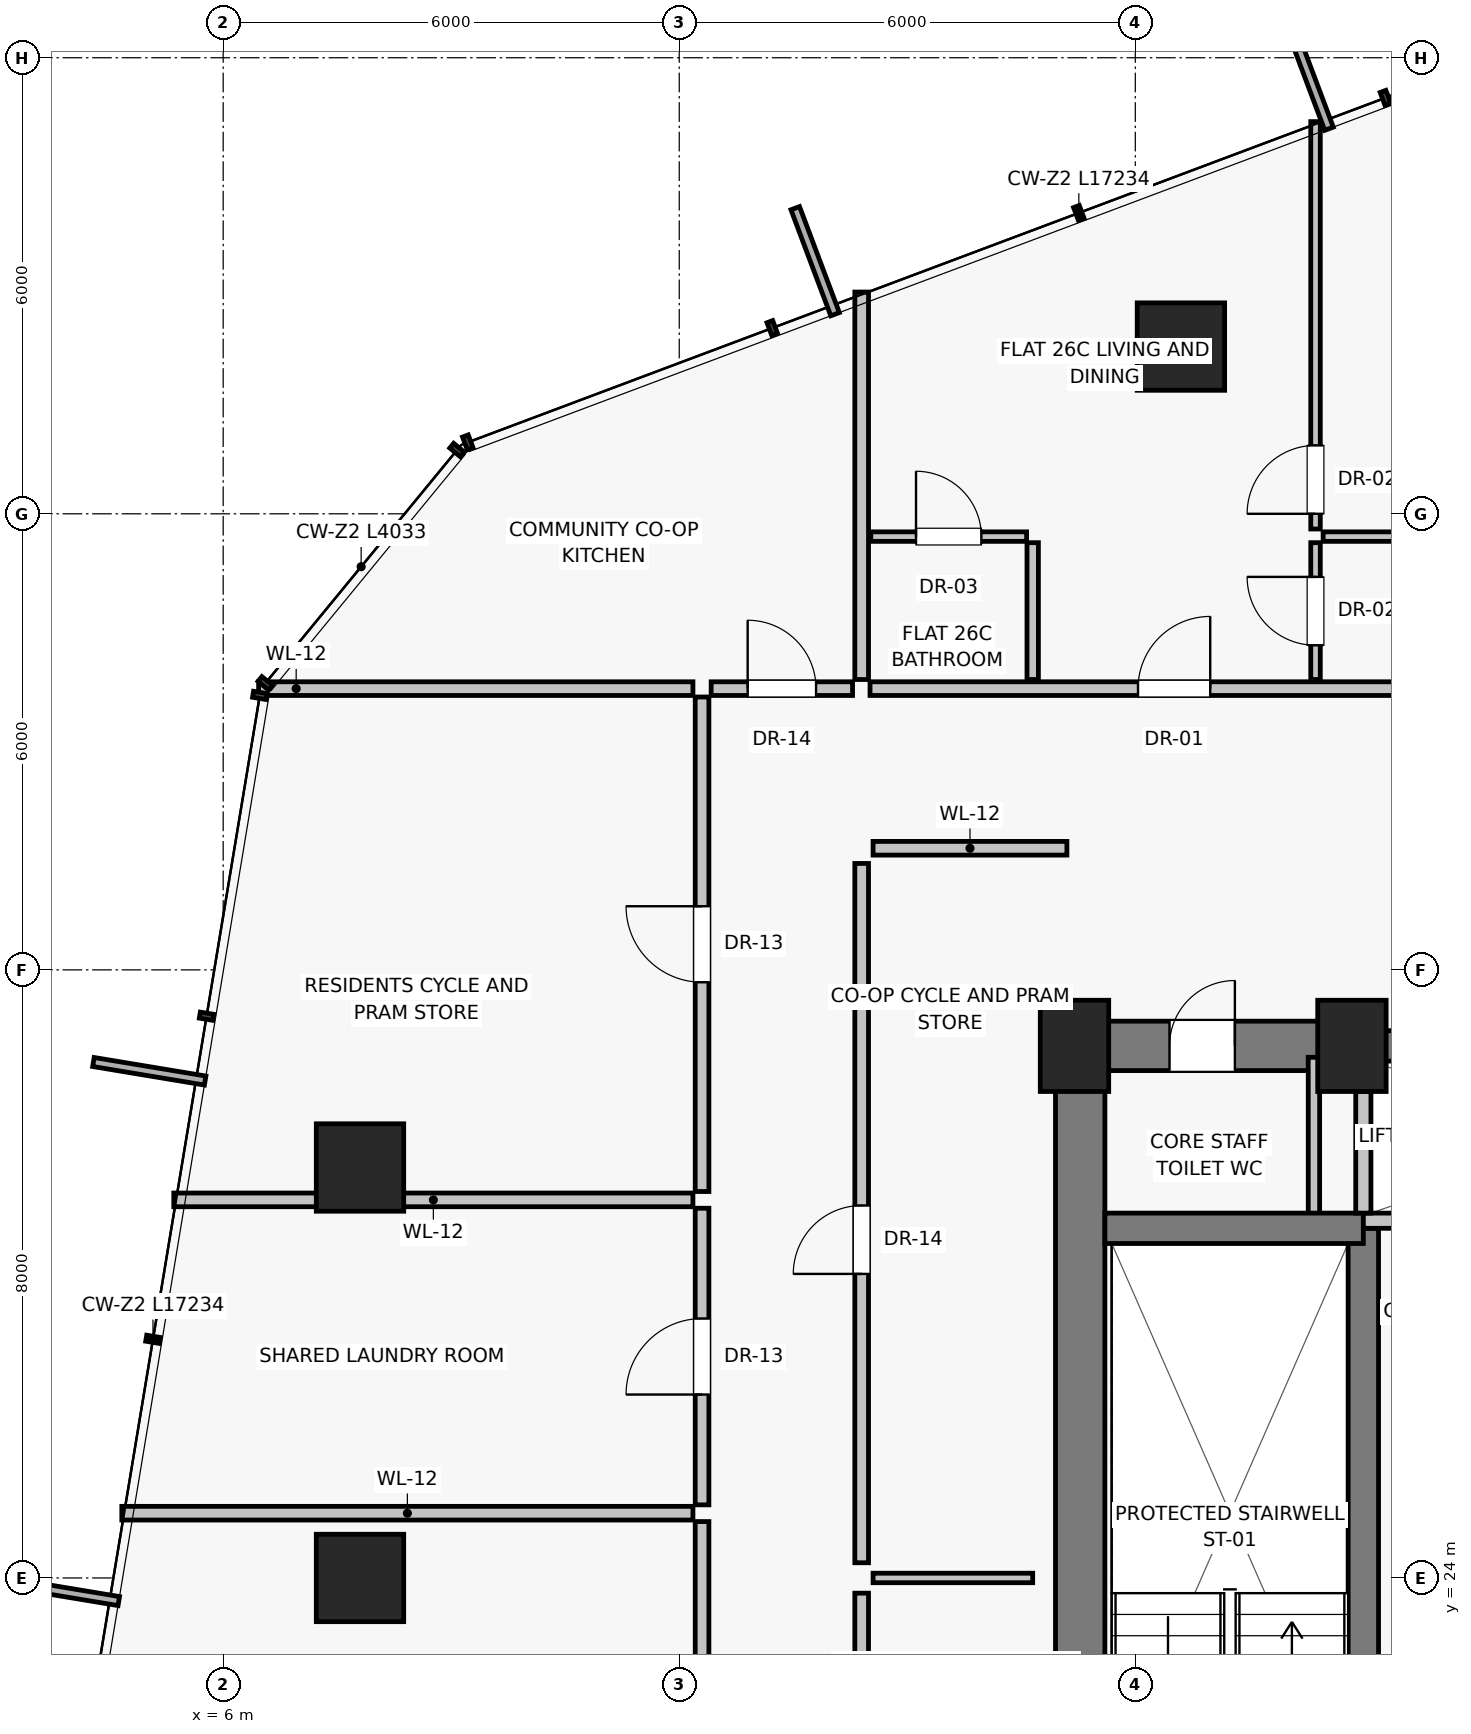
"""IFC4 building model, lengths in metres.
Left out: names, types, materials, properties, quantities, classifications, styles, units other than length and angle.
Written with IfcOpenShell. Run it as: python <this file> out.ifc"""

import sys

from ifc_helpers import new_model, si_unit, direction, frame, frame_2d, origin, origin_2d, place, context, subcontext, project, spatial, rectangle, extrude, source, transform, mapped, element, fill, save


model = new_model("IFC4")
c1 = context("Model", 3, precision=1e-05, world=origin(), true_north=direction((0.0, 1.0)))
c2 = subcontext(c1, "Body", "Model", "MODEL_VIEW")
j1 = project(units=[si_unit("LENGTHUNIT", "METRE"), si_unit("PLANEANGLEUNIT", "RADIAN")], contexts=[c1])
p1 = place(None, origin())
s1 = spatial("IfcSite", under=j1, at=p1, CompositionType="ELEMENT")
p2 = place(p1, origin())
s2 = spatial("IfcBuilding", under=s1, at=p2, CompositionType="ELEMENT")
p3 = place(p2, frame((0.0, 0.0, 95.95)))
s3 = spatial("IfcBuildingStorey", under=s2, at=p3, CompositionType="ELEMENT", Elevation=95.95)
for number, where, z_axis, x_axis in (
    (1, (17.2, 31.0, 0.0), (0.0, 0.0, 1.0), (1.0, 0.0, 0.0)),
    (2, (20.85, 31.0, 0.0), (0.0, 0.0, 1.0), (1.0, 0.0, 0.0)),
):
    element("IfcColumn", number, at=place(p3, frame(where, z_axis=z_axis, x_axis=x_axis)), inside=s3, PredefinedType="PILASTER", context=c2, shape_type="SweptSolid", body=[
        extrude(rectangle(XDim=0.9, YDim=1.2, at=origin_2d()), origin(), (0.0, 0.0, 1.0), 3.25),
    ])
for number, where, z_axis, x_axis in (
    (3, (18.6, 40.2, 0.0), (0.0, 0.0, 1.0), (1.0, 0.0, 0.0)),
    (4, (7.8, 29.4, 0.0), (0.0, 0.0, 1.0), (1.0, 0.0, 0.0)),
    (5, (7.8, 24.0, 0.0), (0.0, 0.0, 1.0), (1.0, 0.0, 0.0)),
):
    element("IfcColumn", number, at=place(p3, frame(where, z_axis=z_axis, x_axis=x_axis)), inside=s3, PredefinedType="COLUMN", context=c2, shape_type="SweptSolid", body=[
        extrude(rectangle(XDim=1.15, YDim=1.15, at=origin_2d()), origin(), (0.0, 0.0, 1.0), 3.25),
    ])
p4 = place(p3, frame((17.275, 16.8, 0.0), z_axis=(0.0, 0.0, 1.0), x_axis=(0.0, 1.0, 0.0)))
e6 = element("IfcWall", 6, at=p4, inside=s3, PredefinedType="SHEAR", context=c2, shape_type="SweptSolid", body=[
    extrude(rectangle(XDim=14.2, YDim=0.65, at=frame_2d((7.1, 0.0))), origin(), (0.0, 0.0, 1.0), 3.0),
])
p5 = place(p3, frame((17.2, 31.0, 0.0), z_axis=(0.0, 0.0, 1.0), x_axis=(1.0, 0.0, 0.0)))
e7 = element("IfcWall", 7, at=p5, inside=s3, PredefinedType="SHEAR", context=c2, shape_type="SweptSolid", body=[
    extrude(rectangle(XDim=3.8, YDim=0.65, at=frame_2d((1.9, 0.0))), origin(), (0.0, 0.0, 1.0), 3.0),
])
p6 = place(p5, frame((1.25, 0.0, 0.0)))
e8 = element("IfcOpeningElement", 8, at=p6, cuts=e7, PredefinedType="OPENING", context=c2, shape_type="SweptSolid", body=[
    extrude(rectangle(XDim=0.86, YDim=2.01, at=frame_2d((0.43, 1.005))), frame((0.0, 0.335, 0.0), z_axis=(0.0, -1.0, 0.0), x_axis=(1.0, 0.0, 0.0)), (0.0, 0.0, 1.0), 0.67),
])
p7 = place(p3, frame((21.0, 31.0, 0.0), z_axis=(0.0, 0.0, 1.0), x_axis=(1.0, 0.0, 0.0)))
e9 = element("IfcWall", 9, at=p7, inside=s3, PredefinedType="SHEAR", context=c2, shape_type="SweptSolid", body=[
    extrude(rectangle(XDim=6.0, YDim=0.4, at=frame_2d((3.0, 0.0))), origin(), (0.0, 0.0, 1.0), 3.0),
])
p8 = place(p3, frame((20.35, 28.65, 0.0), z_axis=(0.0, 0.0, 1.0), x_axis=(0.0, 1.0, 0.0)))
e10 = element("IfcWall", 10, at=p8, inside=s3, PredefinedType="PARTITIONING", context=c2, shape_type="SweptSolid", body=[
    extrude(rectangle(XDim=2.2, YDim=0.15, at=frame_2d((1.1, 0.0))), origin(), (0.0, 0.0, 1.0), 3.0),
])
p9 = place(p3, frame((21.0, 19.8, 0.0), z_axis=(0.0, 0.0, 1.0), x_axis=(0.0, 1.0, 0.0)))
e11 = element("IfcWall", 11, at=p9, inside=s3, PredefinedType="SHEAR", context=c2, shape_type="SweptSolid", body=[
    extrude(rectangle(XDim=8.8, YDim=0.4, at=frame_2d((4.4, 0.0))), origin(), (0.0, 0.0, 1.0), 3.0),
])
p10 = place(p3, frame((17.6, 28.6, 0.0), z_axis=(0.0, 0.0, 1.0), x_axis=(1.0, 0.0, 0.0)))
e12 = element("IfcWall", 12, at=p10, inside=s3, PredefinedType="SHEAR", context=c2, shape_type="SweptSolid", body=[
    extrude(rectangle(XDim=3.4, YDim=0.4, at=frame_2d((1.7, 0.0))), origin(), (0.0, 0.0, 1.0), 3.0),
])
p11 = place(p3, frame((21.0, 28.7, 0.0), z_axis=(0.0, 0.0, 1.0), x_axis=(1.0, 0.0, 0.0)))
e13 = element("IfcWall", 13, at=p11, inside=s3, PredefinedType="SOLIDWALL", context=c2, shape_type="SweptSolid", body=[
    extrude(rectangle(XDim=6.0, YDim=0.2, at=frame_2d((3.0, 0.0))), origin(), (0.0, 0.0, 1.0), 3.0),
])
p12 = place(p3, frame((21.0, 28.8, 0.0), z_axis=(0.0, 0.0, 1.0), x_axis=(0.0, 1.0, 0.0)))
e14 = element("IfcWall", 14, at=p12, inside=s3, PredefinedType="SOLIDWALL", context=c2, shape_type="SweptSolid", body=[
    extrude(rectangle(XDim=1.6, YDim=0.2, at=frame_2d((0.8, 0.0))), origin(), (0.0, 0.0, 1.0), 3.0),
])
p13 = place(p3, frame((14.4, 14.4, 0.0), z_axis=(0.0, 0.0, 1.0), x_axis=(0.0, 1.0, 0.0)))
e15 = element("IfcWall", 15, at=p13, inside=s3, PredefinedType="PARTITIONING", context=c2, shape_type="SweptSolid", body=[
    extrude(rectangle(XDim=9.4, YDim=0.18, at=frame_2d((4.7, 0.0))), origin(), (0.0, 0.0, 1.0), 3.0),
])
p14 = place(p13, frame((3.8, 0.0, 0.0)))
e16 = element("IfcOpeningElement", 16, at=p14, cuts=e15, PredefinedType="OPENING", context=c2, shape_type="SweptSolid", body=[
    extrude(rectangle(XDim=0.9, YDim=2.01, at=frame_2d((0.45, 1.005))), frame((0.0, 0.1, 0.0), z_axis=(0.0, -1.0, 0.0), x_axis=(1.0, 0.0, 0.0)), (0.0, 0.0, 1.0), 0.2),
])
p15 = place(p3, frame((14.4, 24.2, 0.0), z_axis=(0.0, 0.0, 1.0), x_axis=(0.0, 1.0, 0.0)))
e17 = element("IfcWall", 17, at=p15, inside=s3, PredefinedType="PARTITIONING", context=c2, shape_type="SweptSolid", body=[
    extrude(rectangle(XDim=9.2, YDim=0.18, at=frame_2d((4.6, 0.0))), origin(), (0.0, 0.0, 1.0), 3.0),
])
p16 = place(p15, frame((3.8, 0.0, 0.0)))
e18 = element("IfcOpeningElement", 18, at=p16, cuts=e17, PredefinedType="OPENING", context=c2, shape_type="SweptSolid", body=[
    extrude(rectangle(XDim=0.9, YDim=2.01, at=frame_2d((0.45, 1.005))), frame((0.0, 0.1, 0.0), z_axis=(0.0, -1.0, 0.0), x_axis=(1.0, 0.0, 0.0)), (0.0, 0.0, 1.0), 0.2),
])
p17 = place(p3, frame((14.55, 24.0, 0.0), z_axis=(0.0, 0.0, 1.0), x_axis=(1.0, 0.0, 0.0)))
e19 = element("IfcWall", 19, at=p17, inside=s3, PredefinedType="PARTITIONING", context=c2, shape_type="SweptSolid", body=[
    extrude(rectangle(XDim=2.1, YDim=0.125, at=frame_2d((1.05, 0.0))), origin(), (0.0, 0.0, 1.0), 3.0),
])
p18 = place(p3, frame((14.55, 33.6, 0.0), z_axis=(0.0, 0.0, 1.0), x_axis=(1.0, 0.0, 0.0)))
e20 = element("IfcWall", 20, at=p18, inside=s3, PredefinedType="PARTITIONING", context=c2, shape_type="SweptSolid", body=[
    extrude(rectangle(XDim=2.55, YDim=0.18, at=frame_2d((1.275, 0.0))), origin(), (0.0, 0.0, 1.0), 3.0),
])
p19 = place(p3, frame((14.4, 35.82, 0.0), z_axis=(0.0, 0.0, 1.0), x_axis=(0.0, 1.0, 0.0)))
e21 = element("IfcWall", 21, at=p19, inside=s3, PredefinedType="PARTITIONING", context=c2, shape_type="SweptSolid", body=[
    extrude(rectangle(XDim=5.097, YDim=0.18, at=frame_2d((2.549, 0.0))), origin(), (0.0, 0.0, 1.0), 3.0),
])
p20 = place(p3, frame((14.51, 35.7, 0.0), z_axis=(0.0, 0.0, 1.0), x_axis=(1.0, 0.0, 0.0)))
e22 = element("IfcWall", 22, at=p20, inside=s3, PredefinedType="PARTITIONING", context=c2, shape_type="SweptSolid", body=[
    extrude(rectangle(XDim=10.636, YDim=0.18, at=frame_2d((5.318, 0.0))), origin(), (0.0, 0.0, 1.0), 2.58),
])
p21 = place(p20, frame((3.525, 0.0, 0.0)))
e23 = element("IfcOpeningElement", 23, at=p21, cuts=e22, PredefinedType="OPENING", context=c2, shape_type="SweptSolid", body=[
    extrude(rectangle(XDim=0.95, YDim=2.02, at=frame_2d((0.475, 1.01))), frame((0.0, 0.1, 0.0), z_axis=(0.0, -1.0, 0.0), x_axis=(1.0, 0.0, 0.0)), (0.0, 0.0, 1.0), 0.2),
])
p22 = place(p3, frame((16.65, 35.82, 0.0), z_axis=(0.0, 0.0, 1.0), x_axis=(0.0, 1.0, 0.0)))
e24 = element("IfcWall", 24, at=p22, inside=s3, PredefinedType="PARTITIONING", context=c2, shape_type="SweptSolid", body=[
    extrude(rectangle(XDim=1.8, YDim=0.15, at=frame_2d((0.9, 0.0))), origin(), (0.0, 0.0, 1.0), 3.0),
])
p23 = place(p3, frame((14.52, 37.7, 0.0), z_axis=(0.0, 0.0, 1.0), x_axis=(1.0, 0.0, 0.0)))
e25 = element("IfcWall", 25, at=p23, inside=s3, PredefinedType="PARTITIONING", context=c2, shape_type="SweptSolid", body=[
    extrude(rectangle(XDim=2.05, YDim=0.125, at=frame_2d((1.025, 0.0))), origin(), (0.0, 0.0, 1.0), 3.0),
])
p24 = place(p23, frame((0.595, 0.0, 0.0)))
e26 = element("IfcOpeningElement", 26, at=p24, cuts=e25, PredefinedType="OPENING", context=c2, shape_type="SweptSolid", body=[
    extrude(rectangle(XDim=0.86, YDim=2.01, at=frame_2d((0.43, 1.005))), frame((0.0, 0.073, 0.0), z_axis=(0.0, -1.0, 0.0), x_axis=(1.0, 0.0, 0.0)), (0.0, 0.0, 1.0), 0.145),
])
p25 = place(p3, frame((20.371, 35.82, 0.0), z_axis=(0.0, 0.0, 1.0), x_axis=(0.0, 1.0, 0.0)))
e27 = element("IfcWall", 27, at=p25, inside=s3, PredefinedType="PARTITIONING", context=c2, shape_type="SweptSolid", body=[
    extrude(rectangle(XDim=1.8, YDim=0.125, at=frame_2d((0.9, 0.0))), origin(), (0.0, 0.0, 1.0), 3.0),
])
p26 = place(p25, frame((0.45, 0.0, 0.0)))
e28 = element("IfcOpeningElement", 28, at=p26, cuts=e27, PredefinedType="OPENING", context=c2, shape_type="SweptSolid", body=[
    extrude(rectangle(XDim=0.9, YDim=2.01, at=frame_2d((0.45, 1.005))), frame((0.0, 0.073, 0.0), z_axis=(0.0, -1.0, 0.0), x_axis=(1.0, 0.0, 0.0)), (0.0, 0.0, 1.0), 0.145),
])
p27 = place(p3, frame((20.471, 37.7, 0.0), z_axis=(0.0, 0.0, 1.0), x_axis=(1.0, 0.0, 0.0)))
e29 = element("IfcWall", 29, at=p27, inside=s3, PredefinedType="PARTITIONING", context=c2, shape_type="SweptSolid", body=[
    extrude(rectangle(XDim=4.665, YDim=0.125, at=frame_2d((2.333, 0.0))), origin(), (0.0, 0.0, 1.0), 3.0),
])
p28 = place(p3, frame((20.371, 37.8, 0.0), z_axis=(0.0, 0.0, 1.0), x_axis=(0.0, 1.0, 0.0)))
e30 = element("IfcWall", 30, at=p28, inside=s3, PredefinedType="PARTITIONING", context=c2, shape_type="SweptSolid", body=[
    extrude(rectangle(XDim=5.359, YDim=0.125, at=frame_2d((2.68, 0.0))), origin(), (0.0, 0.0, 1.0), 3.0),
])
p29 = place(p28, frame((0.2, 0.0, 0.0)))
e31 = element("IfcOpeningElement", 31, at=p29, cuts=e30, PredefinedType="OPENING", context=c2, shape_type="SweptSolid", body=[
    extrude(rectangle(XDim=0.9, YDim=2.01, at=frame_2d((0.45, 1.005))), frame((0.0, 0.073, 0.0), z_axis=(0.0, -1.0, 0.0), x_axis=(1.0, 0.0, 0.0)), (0.0, 0.0, 1.0), 0.145),
])
p30 = place(p3, frame((12.18, 35.7, 0.0), z_axis=(0.0, 0.0, 1.0), x_axis=(-1.0, 0.0, 0.0)))
e32 = element("IfcWall", 32, at=p30, inside=s3, PredefinedType="PARTITIONING", context=c2, shape_type="SweptSolid", body=[
    extrude(rectangle(XDim=5.714, YDim=0.18, at=frame_2d((2.857, 0.0))), origin(), (0.0, 0.0, 1.0), 3.0),
])
p31 = place(p3, frame((12.3, 17.056, 0.0), z_axis=(0.0, 0.0, 1.0), x_axis=(0.0, 1.0, 0.0)))
e33 = element("IfcWall", 33, at=p31, inside=s3, PredefinedType="PARTITIONING", context=c2, shape_type="SweptSolid", body=[
    extrude(rectangle(XDim=7.686, YDim=0.18, at=frame_2d((3.843, 0.0))), origin(), (0.0, 0.0, 1.0), 2.58),
])
p32 = place(p31, frame((3.343, 0.0, 0.0)))
e34 = element("IfcOpeningElement", 34, at=p32, cuts=e33, PredefinedType="OPENING", context=c2, shape_type="SweptSolid", body=[
    extrude(rectangle(XDim=1.0, YDim=2.01, at=frame_2d((0.5, 1.005))), frame((0.0, 0.1, 0.0), z_axis=(0.0, -1.0, 0.0), x_axis=(1.0, 0.0, 0.0)), (0.0, 0.0, 1.0), 0.2),
])
p33 = place(p3, frame((12.18, 24.852, 0.0), z_axis=(0.0, 0.0, 1.0), x_axis=(-1.0, 0.0, 0.0)))
e35 = element("IfcWall", 35, at=p33, inside=s3, PredefinedType="PARTITIONING", context=c2, shape_type="SweptSolid", body=[
    extrude(rectangle(XDim=7.514, YDim=0.18, at=frame_2d((3.757, 0.0))), origin(), (0.0, 0.0, 1.0), 3.0),
])
p34 = place(p3, frame((12.3, 24.962, 0.0), z_axis=(0.0, 0.0, 1.0), x_axis=(0.0, 1.0, 0.0)))
e36 = element("IfcWall", 36, at=p34, inside=s3, PredefinedType="PARTITIONING", context=c2, shape_type="SweptSolid", body=[
    extrude(rectangle(XDim=3.902, YDim=0.18, at=frame_2d((1.951, 0.0))), origin(), (0.0, 0.0, 1.0), 2.58),
])
p35 = place(p34, frame((1.451, 0.0, 0.0)))
e37 = element("IfcOpeningElement", 37, at=p35, cuts=e36, PredefinedType="OPENING", context=c2, shape_type="SweptSolid", body=[
    extrude(rectangle(XDim=1.0, YDim=2.01, at=frame_2d((0.5, 1.005))), frame((0.0, 0.1, 0.0), z_axis=(0.0, -1.0, 0.0), x_axis=(1.0, 0.0, 0.0)), (0.0, 0.0, 1.0), 0.2),
])
p36 = place(p3, frame((12.3, 29.084, 0.0), z_axis=(0.0, 0.0, 1.0), x_axis=(0.0, 1.0, 0.0)))
e38 = element("IfcWall", 38, at=p36, inside=s3, PredefinedType="PARTITIONING", context=c2, shape_type="SweptSolid", body=[
    extrude(rectangle(XDim=6.506, YDim=0.18, at=frame_2d((3.253, 0.0))), origin(), (0.0, 0.0, 1.0), 2.58),
])
p37 = place(p36, frame((2.753, 0.0, 0.0)))
e39 = element("IfcOpeningElement", 39, at=p37, cuts=e38, PredefinedType="OPENING", context=c2, shape_type="SweptSolid", body=[
    extrude(rectangle(XDim=1.0, YDim=2.01, at=frame_2d((0.5, 1.005))), frame((0.0, 0.1, 0.0), z_axis=(0.0, -1.0, 0.0), x_axis=(1.0, 0.0, 0.0)), (0.0, 0.0, 1.0), 0.2),
])
p38 = place(p3, frame((12.18, 28.974, 0.0), z_axis=(0.0, 0.0, 1.0), x_axis=(-1.0, 0.0, 0.0)))
e40 = element("IfcWall", 40, at=p38, inside=s3, PredefinedType="PARTITIONING", context=c2, shape_type="SweptSolid", body=[
    extrude(rectangle(XDim=6.83, YDim=0.18, at=frame_2d((3.415, 0.0))), origin(), (0.0, 0.0, 1.0), 2.378),
])
p39 = place(p3, frame((12.42, 35.7, 0.0), z_axis=(0.0, 0.0, 1.0), x_axis=(1.0, 0.0, 0.0)))
e41 = element("IfcWall", 41, at=p39, inside=s3, PredefinedType="PARTITIONING", context=c2, shape_type="SweptSolid", body=[
    extrude(rectangle(XDim=1.86, YDim=0.18, at=frame_2d((0.93, 0.0))), origin(), (0.0, 0.0, 1.0), 3.0),
])
p40 = place(p39, frame((0.48, 0.0, 0.0)))
e42 = element("IfcOpeningElement", 42, at=p40, cuts=e41, PredefinedType="OPENING", context=c2, shape_type="SweptSolid", body=[
    extrude(rectangle(XDim=0.9, YDim=2.01, at=frame_2d((0.45, 1.005))), frame((0.0, 0.1, 0.0), z_axis=(0.0, -1.0, 0.0), x_axis=(1.0, 0.0, 0.0)), (0.0, 0.0, 1.0), 0.2),
])
m1 = source(origin(), c2, "Body", "SweptSolid", [
    extrude(rectangle(XDim=0.86, YDim=2.01, at=frame_2d((0.43, 1.005))), frame((0.0, 0.025, 0.0), z_axis=(0.0, -1.0, 0.0), x_axis=(1.0, 0.0, 0.0)), (0.0, 0.0, 1.0), 0.05),
])
p41 = place(p6, origin())
e43 = element("IfcDoor", 43, at=p41, inside=s3, OperationType="SINGLE_SWING_RIGHT", PredefinedType="DOOR", context=c2, shape_type="MappedRepresentation", body=[
    mapped(m1, transform((0.0, 0.0, 0.0), scale=1.0)),
])
fill(e8, e43)
m2 = source(origin(), c2, "Body", "SweptSolid", [
    extrude(rectangle(XDim=0.9, YDim=2.01, at=frame_2d((0.45, 1.005))), frame((0.0, 0.025, 0.0), z_axis=(0.0, -1.0, 0.0), x_axis=(1.0, 0.0, 0.0)), (0.0, 0.0, 1.0), 0.05),
])
p42 = place(p16, origin())
e44 = element("IfcDoor", 44, at=p42, inside=s3, OperationType="SINGLE_SWING_LEFT", PredefinedType="DOOR", context=c2, shape_type="MappedRepresentation", body=[
    mapped(m2, transform((0.0, 0.0, 0.0), scale=1.0)),
])
fill(e18, e44)
m3 = source(origin(), c2, "Body", "SweptSolid", [
    extrude(rectangle(XDim=0.95, YDim=2.02, at=frame_2d((0.475, 1.01))), frame((0.0, 0.025, 0.0), z_axis=(0.0, -1.0, 0.0), x_axis=(1.0, 0.0, 0.0)), (0.0, 0.0, 1.0), 0.05),
])
p43 = place(p21, origin())
e45 = element("IfcDoor", 45, at=p43, inside=s3, OperationType="SINGLE_SWING_RIGHT", PredefinedType="DOOR", context=c2, shape_type="MappedRepresentation", body=[
    mapped(m3, transform((0.0, 0.0, 0.0), scale=1.0)),
])
fill(e23, e45)
p44 = place(p24, origin())
e46 = element("IfcDoor", 46, at=p44, inside=s3, OperationType="SINGLE_SWING_LEFT", PredefinedType="DOOR", context=c2, shape_type="MappedRepresentation", body=[
    mapped(m1, transform((0.0, 0.0, 0.0), scale=1.0)),
])
fill(e26, e46)
p45 = place(p26, origin())
e47 = element("IfcDoor", 47, at=p45, inside=s3, OperationType="SINGLE_SWING_RIGHT", PredefinedType="DOOR", context=c2, shape_type="MappedRepresentation", body=[
    mapped(m2, transform((0.0, 0.0, 0.0), scale=1.0)),
])
fill(e28, e47)
p46 = place(p29, origin())
e48 = element("IfcDoor", 48, at=p46, inside=s3, OperationType="SINGLE_SWING_LEFT", PredefinedType="DOOR", context=c2, shape_type="MappedRepresentation", body=[
    mapped(m2, transform((0.0, 0.0, 0.0), scale=1.0)),
])
fill(e31, e48)
m4 = source(origin(), c2, "Body", "SweptSolid", [
    extrude(rectangle(XDim=1.0, YDim=2.01, at=frame_2d((0.5, 1.005))), frame((0.0, 0.025, 0.0), z_axis=(0.0, -1.0, 0.0), x_axis=(1.0, 0.0, 0.0)), (0.0, 0.0, 1.0), 0.05),
])
p47 = place(p35, origin())
e49 = element("IfcDoor", 49, at=p47, inside=s3, OperationType="SINGLE_SWING_LEFT", PredefinedType="DOOR", context=c2, shape_type="MappedRepresentation", body=[
    mapped(m4, transform((0.0, 0.0, 0.0), scale=1.0)),
])
fill(e37, e49)
p48 = place(p37, origin())
e50 = element("IfcDoor", 50, at=p48, inside=s3, OperationType="SINGLE_SWING_RIGHT", PredefinedType="DOOR", context=c2, shape_type="MappedRepresentation", body=[
    mapped(m4, transform((0.0, 0.0, 0.0), scale=1.0)),
])
fill(e39, e50)
p49 = place(p40, origin())
e51 = element("IfcDoor", 51, at=p49, inside=s3, OperationType="SINGLE_SWING_LEFT", PredefinedType="DOOR", context=c2, shape_type="MappedRepresentation", body=[
    mapped(m2, transform((0.0, 0.0, 0.0), scale=1.0)),
])
fill(e42, e51)
save(model, sys.argv[1])
